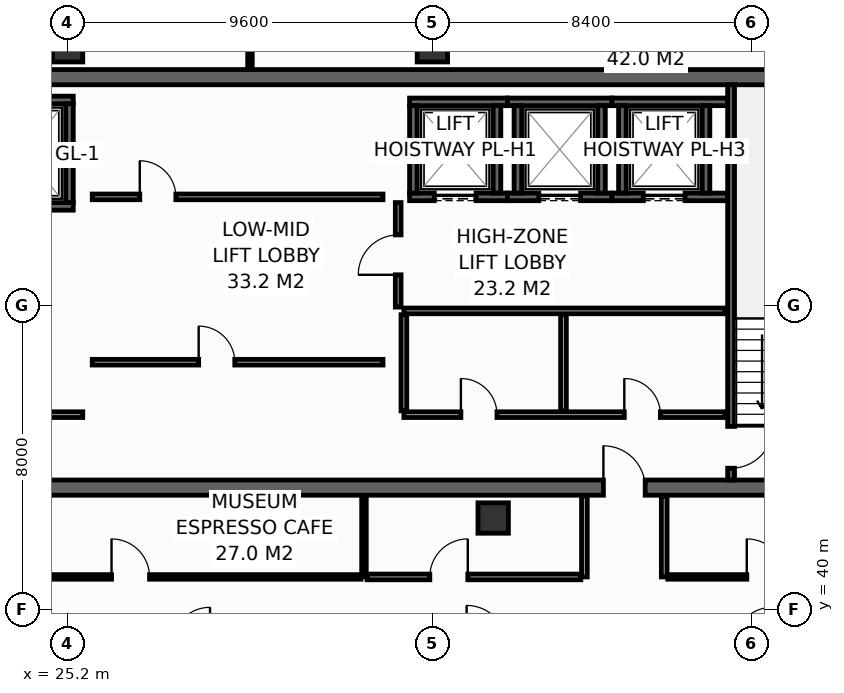
"""IFC4 building model, lengths in metres.
Left out: names, types, materials, properties, quantities, classifications, styles, units other than length and angle.
Written with IfcOpenShell. Run it as: python <this file> out.ifc"""

import sys

from ifc_helpers import new_model, si_unit, direction, frame, frame_2d, origin, origin_2d, place, context, subcontext, project, spatial, rectangle, hollow_rectangle, extrude, element, fill, save


model = new_model("IFC4")
c1 = context("Model", 3, precision=1e-05, world=origin(), true_north=direction((0.0, 1.0)))
c2 = subcontext(c1, "Body", "Model", "MODEL_VIEW")
j1 = project(units=[si_unit("LENGTHUNIT", "METRE"), si_unit("PLANEANGLEUNIT", "RADIAN")], contexts=[c1])
p1 = place(None, origin())
s1 = spatial("IfcSite", under=j1, at=p1, CompositionType="ELEMENT")
p2 = place(p1, origin())
s2 = spatial("IfcBuilding", under=s1, at=p2, CompositionType="ELEMENT")
p3 = place(p2, frame((0.0, 0.0, 253.4)))
s3 = spatial("IfcBuildingStorey", under=s2, at=p3, CompositionType="ELEMENT", Elevation=253.4)
p4 = place(p3, frame((13.7, 43.2, 0.0), z_axis=(0.0, 0.0, 1.0), x_axis=(1.0, 0.0, 0.0)))
e1 = element("IfcWall", 1, at=p4, inside=s3, PredefinedType="SHEAR", context=c2, shape_type="SweptSolid", body=[
    extrude(rectangle(XDim=32.5, YDim=0.4, at=frame_2d((16.25, 0.0))), origin(), (0.0, 0.0, 1.0), 3.55),
])
p5 = place(p4, frame((5.4, 0.0, 0.0)))
e2 = element("IfcOpeningElement", 2, at=p5, cuts=e1, PredefinedType="OPENING", context=c2, shape_type="SweptSolid", body=[
    extrude(rectangle(XDim=1.1, YDim=2.15, at=frame_2d((0.55, 1.075))), frame((0.0, 0.21, 0.0), z_axis=(0.0, -1.0, 0.0), x_axis=(1.0, 0.0, 0.0)), (0.0, 0.0, 1.0), 0.42),
])
p6 = place(p4, frame((25.6, 0.0, 0.0)))
e3 = element("IfcOpeningElement", 3, at=p6, cuts=e1, PredefinedType="OPENING", context=c2, shape_type="SweptSolid", body=[
    extrude(rectangle(XDim=1.1, YDim=2.15, at=frame_2d((0.55, 1.075))), frame((0.0, 0.21, 0.0), z_axis=(0.0, -1.0, 0.0), x_axis=(1.0, 0.0, 0.0)), (0.0, 0.0, 1.0), 0.42),
])
p7 = place(p3, frame((13.7, 54.0, 0.0), z_axis=(0.0, 0.0, 1.0), x_axis=(1.0, 0.0, 0.0)))
e4 = element("IfcWall", 4, at=p7, inside=s3, PredefinedType="SHEAR", context=c2, shape_type="SweptSolid", body=[
    extrude(rectangle(XDim=32.5, YDim=0.4, at=frame_2d((16.25, 0.0))), origin(), (0.0, 0.0, 1.0), 3.55),
])
for number, where, z_axis, x_axis in (
    (5, (25.2, 54.8, 0.0), (0.0, 0.0, 1.0), (1.0, 0.0, 0.0)),
    (6, (34.8, 54.8, 0.0), (0.0, 0.0, 1.0), (1.0, 0.0, 0.0)),
    (7, (36.4, 42.4, 0.0), (0.0, 0.0, 1.0), (1.0, 0.0, 0.0)),
):
    element("IfcColumn", number, at=place(p3, frame(where, z_axis=z_axis, x_axis=x_axis)), inside=s3, PredefinedType="COLUMN", context=c2, shape_type="SweptSolid", body=[
        extrude(hollow_rectangle(XDim=0.8, YDim=0.8, WallThickness=0.036, at=origin_2d()), origin(), (0.0, 0.0, 1.0), 3.8),
    ])
p8 = place(p3, frame((22.5, 50.6, 0.0), z_axis=(0.0, 0.0, 1.0), x_axis=(1.0, 0.0, 0.0)))
e8 = element("IfcWall", 8, at=p8, inside=s3, PredefinedType="SHEAR", context=c2, shape_type="SweptSolid", body=[
    extrude(rectangle(XDim=2.85, YDim=0.2, at=frame_2d((1.425, 0.0))), origin(), (0.0, 0.0, 1.0), 3.55),
])
p9 = place(p8, frame((0.925, 0.0, 0.0)))
e9 = element("IfcOpeningElement", 9, at=p9, cuts=e8, PredefinedType="OPENING", context=c2, shape_type="SweptSolid", body=[
    extrude(rectangle(XDim=1.25, YDim=2.3, at=frame_2d((0.625, 1.15))), frame((0.0, 0.11, 0.0), z_axis=(0.0, -1.0, 0.0), x_axis=(1.0, 0.0, 0.0)), (0.0, 0.0, 1.0), 0.22),
])
p10 = place(p3, frame((22.5, 53.4, 0.0), z_axis=(0.0, 0.0, 1.0), x_axis=(1.0, 0.0, 0.0)))
e10 = element("IfcWall", 10, at=p10, inside=s3, PredefinedType="SHEAR", context=c2, shape_type="SweptSolid", body=[
    extrude(rectangle(XDim=2.85, YDim=0.2, at=frame_2d((1.425, 0.0))), origin(), (0.0, 0.0, 1.0), 3.55),
])
p11 = place(p3, frame((25.25, 50.7, 0.0), z_axis=(0.0, 0.0, 1.0), x_axis=(0.0, 1.0, 0.0)))
e11 = element("IfcWall", 11, at=p11, inside=s3, PredefinedType="SHEAR", context=c2, shape_type="SweptSolid", body=[
    extrude(rectangle(XDim=2.6, YDim=0.2, at=frame_2d((1.3, 0.0))), origin(), (0.0, 0.0, 1.0), 3.55),
])
p12 = place(p3, frame((34.2, 50.85, 0.0), z_axis=(0.0, 0.0, 1.0), x_axis=(1.0, 0.0, 0.0)))
e12 = element("IfcWall", 12, at=p12, inside=s3, PredefinedType="SHEAR", context=c2, shape_type="SweptSolid", body=[
    extrude(rectangle(XDim=2.575, YDim=0.2, at=frame_2d((1.288, 0.0))), origin(), (0.0, 0.0, 1.0), 3.55),
])
p13 = place(p12, frame((0.65, 0.0, 0.0)))
e13 = element("IfcOpeningElement", 13, at=p13, cuts=e12, PredefinedType="OPENING", context=c2, shape_type="SweptSolid", body=[
    extrude(rectangle(XDim=1.1, YDim=2.2, at=frame_2d((0.55, 1.1))), frame((0.0, 0.11, 0.0), z_axis=(0.0, -1.0, 0.0), x_axis=(1.0, 0.0, 0.0)), (0.0, 0.0, 1.0), 0.22),
])
p14 = place(p3, frame((34.2, 53.35, 0.0), z_axis=(0.0, 0.0, 1.0), x_axis=(1.0, 0.0, 0.0)))
e14 = element("IfcWall", 14, at=p14, inside=s3, PredefinedType="SHEAR", context=c2, shape_type="SweptSolid", body=[
    extrude(rectangle(XDim=2.575, YDim=0.2, at=frame_2d((1.288, 0.0))), origin(), (0.0, 0.0, 1.0), 3.55),
])
for number, where, z_axis, x_axis in (
    (15, (34.3, 50.95, 0.0), (0.0, 0.0, 1.0), (0.0, 1.0, 0.0)),
    (16, (36.5, 50.95, 0.0), (0.0, 0.0, 1.0), (0.0, 1.0, 0.0)),
):
    element("IfcWall", number, at=place(p3, frame(where, z_axis=z_axis, x_axis=x_axis)), inside=s3, PredefinedType="SHEAR", context=c2, shape_type="SweptSolid", body=[
        extrude(rectangle(XDim=2.3, YDim=0.2, at=frame_2d((1.15, 0.0))), origin(), (0.0, 0.0, 1.0), 3.55),
    ])
p15 = place(p3, frame((36.775, 50.85, 0.0), z_axis=(0.0, 0.0, 1.0), x_axis=(1.0, 0.0, 0.0)))
e17 = element("IfcWall", 17, at=p15, inside=s3, PredefinedType="SHEAR", context=c2, shape_type="SweptSolid", body=[
    extrude(rectangle(XDim=2.75, YDim=0.2, at=frame_2d((1.375, 0.0))), origin(), (0.0, 0.0, 1.0), 3.55),
])
p16 = place(p15, frame((0.825, 0.0, 0.0)))
e18 = element("IfcOpeningElement", 18, at=p16, cuts=e17, PredefinedType="OPENING", context=c2, shape_type="SweptSolid", body=[
    extrude(rectangle(XDim=1.1, YDim=2.2, at=frame_2d((0.55, 1.1))), frame((0.0, 0.11, 0.0), z_axis=(0.0, -1.0, 0.0), x_axis=(1.0, 0.0, 0.0)), (0.0, 0.0, 1.0), 0.22),
])
p17 = place(p3, frame((36.775, 53.35, 0.0), z_axis=(0.0, 0.0, 1.0), x_axis=(1.0, 0.0, 0.0)))
e19 = element("IfcWall", 19, at=p17, inside=s3, PredefinedType="SHEAR", context=c2, shape_type="SweptSolid", body=[
    extrude(rectangle(XDim=2.75, YDim=0.2, at=frame_2d((1.375, 0.0))), origin(), (0.0, 0.0, 1.0), 3.55),
])
for number, where, z_axis, x_axis in (
    (20, (37.05, 50.95, 0.0), (0.0, 0.0, 1.0), (0.0, 1.0, 0.0)),
    (21, (39.25, 50.95, 0.0), (0.0, 0.0, 1.0), (0.0, 1.0, 0.0)),
):
    element("IfcWall", number, at=place(p3, frame(where, z_axis=z_axis, x_axis=x_axis)), inside=s3, PredefinedType="SHEAR", context=c2, shape_type="SweptSolid", body=[
        extrude(rectangle(XDim=2.3, YDim=0.2, at=frame_2d((1.15, 0.0))), origin(), (0.0, 0.0, 1.0), 3.55),
    ])
p18 = place(p3, frame((39.525, 50.85, 0.0), z_axis=(0.0, 0.0, 1.0), x_axis=(1.0, 0.0, 0.0)))
e22 = element("IfcWall", 22, at=p18, inside=s3, PredefinedType="SHEAR", context=c2, shape_type="SweptSolid", body=[
    extrude(rectangle(XDim=3.045, YDim=0.2, at=frame_2d((1.522, 0.0))), origin(), (0.0, 0.0, 1.0), 3.55),
])
p19 = place(p18, frame((0.825, 0.0, 0.0)))
e23 = element("IfcOpeningElement", 23, at=p19, cuts=e22, PredefinedType="OPENING", context=c2, shape_type="SweptSolid", body=[
    extrude(rectangle(XDim=1.1, YDim=2.2, at=frame_2d((0.55, 1.1))), frame((0.0, 0.11, 0.0), z_axis=(0.0, -1.0, 0.0), x_axis=(1.0, 0.0, 0.0)), (0.0, 0.0, 1.0), 0.22),
])
p20 = place(p3, frame((39.525, 53.35, 0.0), z_axis=(0.0, 0.0, 1.0), x_axis=(1.0, 0.0, 0.0)))
e24 = element("IfcWall", 24, at=p20, inside=s3, PredefinedType="SHEAR", context=c2, shape_type="SweptSolid", body=[
    extrude(rectangle(XDim=3.045, YDim=0.2, at=frame_2d((1.522, 0.0))), origin(), (0.0, 0.0, 1.0), 3.55),
])
for number, where, z_axis, x_axis in (
    (25, (39.8, 50.95, 0.0), (0.0, 0.0, 1.0), (0.0, 1.0, 0.0)),
    (26, (42.0, 50.95, 0.0), (0.0, 0.0, 1.0), (0.0, 1.0, 0.0)),
):
    element("IfcWall", number, at=place(p3, frame(where, z_axis=z_axis, x_axis=x_axis)), inside=s3, PredefinedType="SHEAR", context=c2, shape_type="SweptSolid", body=[
        extrude(rectangle(XDim=2.3, YDim=0.2, at=frame_2d((1.15, 0.0))), origin(), (0.0, 0.0, 1.0), 3.55),
    ])
p21 = place(p3, frame((42.66, 53.8, 0.0), z_axis=(0.0, 0.0, 1.0), x_axis=(0.0, -1.0, 0.0)))
e27 = element("IfcWall", 27, at=p21, inside=s3, PredefinedType="SHEAR", context=c2, shape_type="SweptSolid", body=[
    extrude(rectangle(XDim=10.4, YDim=0.18, at=frame_2d((5.2, 0.0))), origin(), (0.0, 0.0, 1.0), 3.55),
])
p22 = place(p21, frame((8.99, 0.0, 0.0)))
e28 = element("IfcOpeningElement", 28, at=p22, cuts=e27, PredefinedType="OPENING", context=c2, shape_type="SweptSolid", body=[
    extrude(rectangle(XDim=1.1, YDim=2.15, at=frame_2d((0.55, 1.075))), frame((0.0, 0.1, 0.0), z_axis=(0.0, -1.0, 0.0), x_axis=(1.0, 0.0, 0.0)), (0.0, 0.0, 1.0), 0.2),
])
p23 = place(p3, frame((22.68, 45.12, 0.0), z_axis=(0.0, 0.0, 1.0), x_axis=(1.0, 0.0, 0.0)))
e29 = element("IfcWall", 29, at=p23, inside=s3, PredefinedType="PARTITIONING", context=c2, shape_type="SweptSolid", body=[
    extrude(rectangle(XDim=2.92, YDim=0.15, at=frame_2d((1.46, 0.0))), origin(), (0.0, 0.0, 1.0), 3.55),
])
p24 = place(p23, frame((0.85, 0.0, 0.0)))
e30 = element("IfcOpeningElement", 30, at=p24, cuts=e29, PredefinedType="OPENING", context=c2, shape_type="SweptSolid", body=[
    extrude(rectangle(XDim=1.1, YDim=2.15, at=frame_2d((0.55, 1.075))), frame((0.0, 0.085, 0.0), z_axis=(0.0, -1.0, 0.0), x_axis=(1.0, 0.0, 0.0)), (0.0, 0.0, 1.0), 0.17),
])
p25 = place(p3, frame((33.9, 47.95, 0.0), z_axis=(0.0, 0.0, 1.0), x_axis=(0.0, 1.0, 0.0)))
e31 = element("IfcWall", 31, at=p25, inside=s3, PredefinedType="PARTITIONING", context=c2, shape_type="SweptSolid", body=[
    extrude(rectangle(XDim=2.75, YDim=0.15, at=frame_2d((1.375, 0.0))), origin(), (0.0, 0.0, 1.0), 3.55),
])
p26 = place(p25, frame((0.85, 0.0, 0.0)))
e32 = element("IfcOpeningElement", 32, at=p26, cuts=e31, PredefinedType="OPENING", context=c2, shape_type="SweptSolid", body=[
    extrude(rectangle(XDim=1.05, YDim=2.15, at=frame_2d((0.525, 1.075))), frame((0.0, 0.085, 0.0), z_axis=(0.0, -1.0, 0.0), x_axis=(1.0, 0.0, 0.0)), (0.0, 0.0, 1.0), 0.17),
])
p27 = place(p3, frame((34.05, 45.12, 0.0), z_axis=(0.0, 0.0, 1.0), x_axis=(1.0, 0.0, 0.0)))
e33 = element("IfcWall", 33, at=p27, inside=s3, PredefinedType="PARTITIONING", context=c2, shape_type="SweptSolid", body=[
    extrude(rectangle(XDim=8.45, YDim=0.15, at=frame_2d((4.225, 0.0))), origin(), (0.0, 0.0, 1.0), 3.55),
])
p28 = place(p27, frame((1.5, 0.0, 0.0)))
e34 = element("IfcOpeningElement", 34, at=p28, cuts=e33, PredefinedType="OPENING", context=c2, shape_type="SweptSolid", body=[
    extrude(rectangle(XDim=0.95, YDim=2.15, at=frame_2d((0.475, 1.075))), frame((0.0, 0.085, 0.0), z_axis=(0.0, -1.0, 0.0), x_axis=(1.0, 0.0, 0.0)), (0.0, 0.0, 1.0), 0.17),
])
p29 = place(p27, frame((5.8, 0.0, 0.0)))
e35 = element("IfcOpeningElement", 35, at=p29, cuts=e33, PredefinedType="OPENING", context=c2, shape_type="SweptSolid", body=[
    extrude(rectangle(XDim=0.95, YDim=2.15, at=frame_2d((0.475, 1.075))), frame((0.0, 0.085, 0.0), z_axis=(0.0, -1.0, 0.0), x_axis=(1.0, 0.0, 0.0)), (0.0, 0.0, 1.0), 0.17),
])
p30 = place(p3, frame((34.05, 47.85, 0.0), z_axis=(0.0, 0.0, 1.0), x_axis=(1.0, 0.0, 0.0)))
e36 = element("IfcWall", 36, at=p30, inside=s3, PredefinedType="PARTITIONING", context=c2, shape_type="SweptSolid", body=[
    extrude(rectangle(XDim=8.45, YDim=0.15, at=frame_2d((4.225, 0.0))), origin(), (0.0, 0.0, 1.0), 3.55),
])
for number, where, z_axis, x_axis in (
    (37, (38.25, 45.22, 0.0), (0.0, 0.0, 1.0), (0.0, 1.0, 0.0)),
    (38, (34.05, 45.22, 0.0), (0.0, 0.0, 1.0), (0.0, 1.0, 0.0)),
):
    element("IfcWall", number, at=place(p3, frame(where, z_axis=z_axis, x_axis=x_axis)), inside=s3, PredefinedType="PARTITIONING", context=c2, shape_type="SweptSolid", body=[
        extrude(rectangle(XDim=2.53, YDim=0.15, at=frame_2d((1.265, 0.0))), origin(), (0.0, 0.0, 1.0), 3.55),
    ])
p31 = place(p3, frame((25.85, 50.85, 0.0), z_axis=(0.0, 0.0, 1.0), x_axis=(1.0, 0.0, 0.0)))
e39 = element("IfcWall", 39, at=p31, inside=s3, PredefinedType="PARTITIONING", context=c2, shape_type="SweptSolid", body=[
    extrude(rectangle(XDim=7.65, YDim=0.15, at=frame_2d((3.825, 0.0))), origin(), (0.0, 0.0, 1.0), 3.55),
])
p32 = place(p31, frame((1.25, 0.0, 0.0)))
e40 = element("IfcOpeningElement", 40, at=p32, cuts=e39, PredefinedType="OPENING", context=c2, shape_type="SweptSolid", body=[
    extrude(rectangle(XDim=0.95, YDim=2.15, at=frame_2d((0.475, 1.075))), frame((0.0, 0.085, 0.0), z_axis=(0.0, -1.0, 0.0), x_axis=(1.0, 0.0, 0.0)), (0.0, 0.0, 1.0), 0.17),
])
p33 = place(p3, frame((25.85, 46.5, 0.0), z_axis=(0.0, 0.0, 1.0), x_axis=(1.0, 0.0, 0.0)))
e41 = element("IfcWall", 41, at=p33, inside=s3, PredefinedType="PARTITIONING", context=c2, shape_type="SweptSolid", body=[
    extrude(rectangle(XDim=7.65, YDim=0.15, at=frame_2d((3.825, 0.0))), origin(), (0.0, 0.0, 1.0), 3.55),
])
p34 = place(p33, frame((2.8, 0.0, 0.0)))
e42 = element("IfcOpeningElement", 42, at=p34, cuts=e41, PredefinedType="OPENING", context=c2, shape_type="SweptSolid", body=[
    extrude(rectangle(XDim=0.95, YDim=2.15, at=frame_2d((0.475, 1.075))), frame((0.0, 0.085, 0.0), z_axis=(0.0, -1.0, 0.0), x_axis=(1.0, 0.0, 0.0)), (0.0, 0.0, 1.0), 0.17),
])
p35 = place(p3, frame((30.0, 54.22, 0.0), z_axis=(0.0, 0.0, 1.0), x_axis=(0.0, 1.0, 0.0)))
e43 = element("IfcWall", 43, at=p35, inside=s3, PredefinedType="PARTITIONING", context=c2, shape_type="SweptSolid", body=[
    extrude(rectangle(XDim=1.775, YDim=0.12, at=frame_2d((0.888, 0.0))), origin(), (0.0, 0.0, 1.0), 2.935),
])
for number, where, z_axis, x_axis in (
    (44, (38.8, 40.85, 0.0), (0.0, 0.0, 1.0), (0.0, 1.0, 0.0)),
    (45, (40.9, 40.85, 0.0), (0.0, 0.0, 1.0), (0.0, 1.0, 0.0)),
):
    element("IfcWall", number, at=place(p3, frame(where, z_axis=z_axis, x_axis=x_axis)), inside=s3, PredefinedType="PARTITIONING", context=c2, shape_type="SweptSolid", body=[
        extrude(rectangle(XDim=2.13, YDim=0.15, at=frame_2d((1.065, 0.0))), origin(), (0.0, 0.0, 1.0), 3.55),
    ])
p36 = place(p3, frame((33.0, 40.85, 0.0), z_axis=(0.0, 0.0, 1.0), x_axis=(0.0, 1.0, 0.0)))
e46 = element("IfcWall", 46, at=p36, inside=s3, PredefinedType="PARTITIONING", context=c2, shape_type="SweptSolid", body=[
    extrude(rectangle(XDim=2.13, YDim=0.12, at=frame_2d((1.065, 0.0))), origin(), (0.0, 0.0, 1.0), 2.947),
])
p37 = place(p3, frame((20.795, 40.85, 0.0), z_axis=(0.0, 0.0, 1.0), x_axis=(1.0, 0.0, 0.0)))
e47 = element("IfcWall", 47, at=p37, inside=s3, PredefinedType="PARTITIONING", context=c2, shape_type="SweptSolid", body=[
    extrude(rectangle(XDim=12.125, YDim=0.12, at=frame_2d((6.062, 0.0))), origin(), (0.0, 0.0, 1.0), 2.947),
])
p38 = place(p37, frame((5.562, 0.0, 0.0)))
e48 = element("IfcOpeningElement", 48, at=p38, cuts=e47, PredefinedType="OPENING", context=c2, shape_type="SweptSolid", body=[
    extrude(rectangle(XDim=1.0, YDim=2.15, at=frame_2d((0.5, 1.075))), frame((0.0, 0.07, 0.0), z_axis=(0.0, -1.0, 0.0), x_axis=(1.0, 0.0, 0.0)), (0.0, 0.0, 1.0), 0.14),
])
p39 = place(p3, frame((33.08, 40.85, 0.0), z_axis=(0.0, 0.0, 1.0), x_axis=(1.0, 0.0, 0.0)))
e49 = element("IfcWall", 49, at=p39, inside=s3, PredefinedType="PARTITIONING", context=c2, shape_type="SweptSolid", body=[
    extrude(rectangle(XDim=5.625, YDim=0.15, at=frame_2d((2.812, 0.0))), origin(), (0.0, 0.0, 1.0), 2.947),
])
p40 = place(p39, frame((1.652, 0.0, 0.0)))
e50 = element("IfcOpeningElement", 50, at=p40, cuts=e49, PredefinedType="OPENING", context=c2, shape_type="SweptSolid", body=[
    extrude(rectangle(XDim=1.0, YDim=2.15, at=frame_2d((0.5, 1.075))), frame((0.0, 0.085, 0.0), z_axis=(0.0, -1.0, 0.0), x_axis=(1.0, 0.0, 0.0)), (0.0, 0.0, 1.0), 0.17),
])
p41 = place(p3, frame((40.995, 40.85, 0.0), z_axis=(0.0, 0.0, 1.0), x_axis=(1.0, 0.0, 0.0)))
e51 = element("IfcWall", 51, at=p41, inside=s3, PredefinedType="PARTITIONING", context=c2, shape_type="SweptSolid", body=[
    extrude(rectangle(XDim=5.155, YDim=0.12, at=frame_2d((2.577, 0.0))), origin(), (0.0, 0.0, 1.0), 3.55),
])
p42 = place(p41, frame((2.078, 0.0, 0.0)))
e52 = element("IfcOpeningElement", 52, at=p42, cuts=e51, PredefinedType="OPENING", context=c2, shape_type="SweptSolid", body=[
    extrude(rectangle(XDim=1.0, YDim=2.15, at=frame_2d((0.5, 1.075))), frame((0.0, 0.07, 0.0), z_axis=(0.0, -1.0, 0.0), x_axis=(1.0, 0.0, 0.0)), (0.0, 0.0, 1.0), 0.14),
])
p43 = place(p13, origin())
e53 = element("IfcDoor", 53, at=p43, inside=s3, OperationType="SLIDING_TO_LEFT", PredefinedType="DOOR", context=c2, shape_type="SweptSolid", body=[
    extrude(rectangle(XDim=1.1, YDim=2.2, at=frame_2d((0.55, 1.1))), frame((0.0, 0.025, 0.0), z_axis=(0.0, -1.0, 0.0), x_axis=(1.0, 0.0, 0.0)), (0.0, 0.0, 1.0), 0.05),
])
fill(e13, e53)
p44 = place(p16, origin())
e54 = element("IfcDoor", 54, at=p44, inside=s3, OperationType="SLIDING_TO_LEFT", PredefinedType="DOOR", context=c2, shape_type="SweptSolid", body=[
    extrude(rectangle(XDim=1.1, YDim=2.2, at=frame_2d((0.55, 1.1))), frame((0.0, 0.025, 0.0), z_axis=(0.0, -1.0, 0.0), x_axis=(1.0, 0.0, 0.0)), (0.0, 0.0, 1.0), 0.05),
])
fill(e18, e54)
p45 = place(p19, origin())
e55 = element("IfcDoor", 55, at=p45, inside=s3, OperationType="SLIDING_TO_LEFT", PredefinedType="DOOR", context=c2, shape_type="SweptSolid", body=[
    extrude(rectangle(XDim=1.1, YDim=2.2, at=frame_2d((0.55, 1.1))), frame((0.0, 0.025, 0.0), z_axis=(0.0, -1.0, 0.0), x_axis=(1.0, 0.0, 0.0)), (0.0, 0.0, 1.0), 0.05),
])
fill(e23, e55)
p46 = place(p22, origin())
e56 = element("IfcDoor", 56, at=p46, inside=s3, OperationType="SINGLE_SWING_LEFT", PredefinedType="DOOR", context=c2, shape_type="SweptSolid", body=[
    extrude(rectangle(XDim=1.1, YDim=2.15, at=frame_2d((0.55, 1.075))), frame((0.0, 0.025, 0.0), z_axis=(0.0, -1.0, 0.0), x_axis=(1.0, 0.0, 0.0)), (0.0, 0.0, 1.0), 0.05),
])
fill(e28, e56)
p47 = place(p6, origin())
e57 = element("IfcDoor", 57, at=p47, inside=s3, OperationType="SINGLE_SWING_LEFT", PredefinedType="DOOR", context=c2, shape_type="SweptSolid", body=[
    extrude(rectangle(XDim=1.1, YDim=2.15, at=frame_2d((0.55, 1.075))), frame((0.0, 0.025, 0.0), z_axis=(0.0, -1.0, 0.0), x_axis=(1.0, 0.0, 0.0)), (0.0, 0.0, 1.0), 0.05),
])
fill(e3, e57)
p48 = place(p26, origin())
e58 = element("IfcDoor", 58, at=p48, inside=s3, OperationType="SINGLE_SWING_LEFT", PredefinedType="DOOR", context=c2, shape_type="SweptSolid", body=[
    extrude(rectangle(XDim=1.05, YDim=2.15, at=frame_2d((0.525, 1.075))), frame((0.0, 0.025, 0.0), z_axis=(0.0, -1.0, 0.0), x_axis=(1.0, 0.0, 0.0)), (0.0, 0.0, 1.0), 0.05),
])
fill(e32, e58)
p49 = place(p28, origin())
e59 = element("IfcDoor", 59, at=p49, inside=s3, OperationType="SINGLE_SWING_LEFT", PredefinedType="DOOR", context=c2, shape_type="SweptSolid", body=[
    extrude(rectangle(XDim=0.95, YDim=2.15, at=frame_2d((0.475, 1.075))), frame((0.0, 0.025, 0.0), z_axis=(0.0, -1.0, 0.0), x_axis=(1.0, 0.0, 0.0)), (0.0, 0.0, 1.0), 0.05),
])
fill(e34, e59)
p50 = place(p29, origin())
e60 = element("IfcDoor", 60, at=p50, inside=s3, OperationType="SINGLE_SWING_LEFT", PredefinedType="DOOR", context=c2, shape_type="SweptSolid", body=[
    extrude(rectangle(XDim=0.95, YDim=2.15, at=frame_2d((0.475, 1.075))), frame((0.0, 0.025, 0.0), z_axis=(0.0, -1.0, 0.0), x_axis=(1.0, 0.0, 0.0)), (0.0, 0.0, 1.0), 0.05),
])
fill(e35, e60)
p51 = place(p32, origin())
e61 = element("IfcDoor", 61, at=p51, inside=s3, OperationType="SINGLE_SWING_LEFT", PredefinedType="DOOR", context=c2, shape_type="SweptSolid", body=[
    extrude(rectangle(XDim=0.95, YDim=2.15, at=frame_2d((0.475, 1.075))), frame((0.0, 0.025, 0.0), z_axis=(0.0, -1.0, 0.0), x_axis=(1.0, 0.0, 0.0)), (0.0, 0.0, 1.0), 0.05),
])
fill(e40, e61)
p52 = place(p34, origin())
e62 = element("IfcDoor", 62, at=p52, inside=s3, OperationType="SINGLE_SWING_LEFT", PredefinedType="DOOR", context=c2, shape_type="SweptSolid", body=[
    extrude(rectangle(XDim=0.95, YDim=2.15, at=frame_2d((0.475, 1.075))), frame((0.0, 0.025, 0.0), z_axis=(0.0, -1.0, 0.0), x_axis=(1.0, 0.0, 0.0)), (0.0, 0.0, 1.0), 0.05),
])
fill(e42, e62)
p53 = place(p38, origin())
e63 = element("IfcDoor", 63, at=p53, inside=s3, OperationType="SINGLE_SWING_LEFT", PredefinedType="DOOR", context=c2, shape_type="SweptSolid", body=[
    extrude(rectangle(XDim=1.0, YDim=2.15, at=frame_2d((0.5, 1.075))), frame((0.0, 0.025, 0.0), z_axis=(0.0, -1.0, 0.0), x_axis=(1.0, 0.0, 0.0)), (0.0, 0.0, 1.0), 0.05),
])
fill(e48, e63)
p54 = place(p40, origin())
e64 = element("IfcDoor", 64, at=p54, inside=s3, OperationType="SINGLE_SWING_RIGHT", PredefinedType="DOOR", context=c2, shape_type="SweptSolid", body=[
    extrude(rectangle(XDim=1.0, YDim=2.15, at=frame_2d((0.5, 1.075))), frame((0.0, 0.025, 0.0), z_axis=(0.0, -1.0, 0.0), x_axis=(1.0, 0.0, 0.0)), (0.0, 0.0, 1.0), 0.05),
])
fill(e50, e64)
p55 = place(p42, origin())
e65 = element("IfcDoor", 65, at=p55, inside=s3, OperationType="SINGLE_SWING_LEFT", PredefinedType="DOOR", context=c2, shape_type="SweptSolid", body=[
    extrude(rectangle(XDim=1.0, YDim=2.15, at=frame_2d((0.5, 1.075))), frame((0.0, 0.025, 0.0), z_axis=(0.0, -1.0, 0.0), x_axis=(1.0, 0.0, 0.0)), (0.0, 0.0, 1.0), 0.05),
])
fill(e52, e65)
save(model, sys.argv[1])
